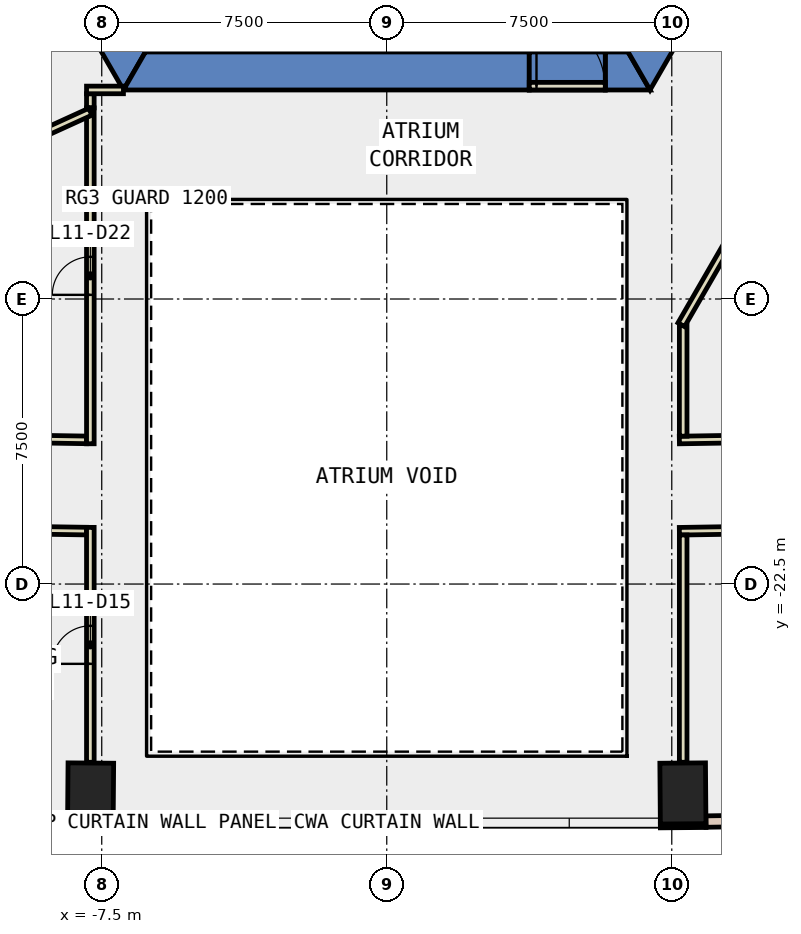
"""IFC4 building model, lengths in metres.
Left out: names, types, materials, properties, quantities, classifications, styles, units other than length and angle.
Written with IfcOpenShell. Run it as: python <this file> out.ifc"""

import sys

from ifc_helpers import new_model, si_unit, direction, frame, frame_2d, origin, origin_2d, place, context, subcontext, project, spatial, polyline, rectangle, outline, extrude, element, fill, save


model = new_model("IFC4")
c1 = context("Model", 3, precision=1e-05, world=origin(), true_north=direction((0.0, 1.0)))
c2 = subcontext(c1, "Body", "Model", "MODEL_VIEW")
j1 = project(units=[si_unit("LENGTHUNIT", "METRE"), si_unit("PLANEANGLEUNIT", "RADIAN")], contexts=[c1])
p1 = place(None, origin())
s1 = spatial("IfcSite", under=j1, at=p1, CompositionType="ELEMENT")
p2 = place(p1, origin())
s2 = spatial("IfcBuilding", under=s1, at=p2, CompositionType="ELEMENT")
p3 = place(p2, frame((0.0, 0.0, 56.0)))
s3 = spatial("IfcBuildingStorey", under=s2, at=p3, CompositionType="ELEMENT", Elevation=56.0)
for number, where, z_axis, x_axis in (
    (1, (-7.793, -28.01, -0.4), (0.0, 0.0, 1.0), (-1.0, 0.008, 0.0)),
    (2, (7.793, -28.01, -0.4), (0.0, 0.0, 1.0), (1.0, 0.008, 0.0)),
):
    element("IfcColumn", number, at=place(p3, frame(where, z_axis=z_axis, x_axis=x_axis)), inside=s3, PredefinedType="COLUMN", context=c2, shape_type="SweptSolid", body=[
        extrude(rectangle(XDim=1.2, YDim=1.6, at=origin_2d()), origin(), (0.0, 0.0, 1.0), 4.2),
    ])
p4 = place(p3, frame((0.0, 0.0, -0.4)))
e3 = element("IfcWall", 3, at=p4, inside=s3, PredefinedType="SHEAR", context=c2, shape_type="SweptSolid", body=[
    extrude(outline(polyline([(-13.856, 2.5), (-6.928, -9.5), (-6.351, -8.5), (-12.702, 2.5), (-13.856, 2.5)])), origin(), (0.0, 0.0, 1.0), 4.2),
])
p5 = place(p3, frame((0.0, 0.0, -0.4)))
e4 = element("IfcWall", 4, at=p5, inside=s3, PredefinedType="SHEAR", context=c2, shape_type="SweptSolid", body=[
    extrude(outline(polyline([(3.75, -9.5), (3.75, -8.5), (-6.351, -8.5), (-6.928, -9.5), (3.75, -9.5)])), origin(), (0.0, 0.0, 1.0), 4.2),
])
p6 = place(p3, frame((0.0, 0.0, -0.4)))
e5 = element("IfcWall", 5, at=p6, inside=s3, PredefinedType="SHEAR", context=c2, shape_type="SweptSolid", body=[
    extrude(outline(polyline([(5.75, -8.5), (5.75, -9.5), (6.928, -9.5), (6.351, -8.5), (5.75, -8.5)])), origin(), (0.0, 0.0, 1.0), 4.2),
])
p7 = place(p3, frame((0.0, 0.0, 3.6)))
e6 = element("IfcWall", 6, at=p7, inside=s3, PredefinedType="SHEAR", context=c2, shape_type="SweptSolid", body=[
    extrude(outline(polyline([(5.75, -9.5), (5.75, -8.5), (3.75, -8.5), (3.75, -9.5), (5.75, -9.5)])), origin(), (0.0, 0.0, 1.0), 0.2),
])
p8 = place(p3, frame((0.0, 0.0, -0.4)))
e7 = element("IfcWall", 7, at=p8, inside=s3, PredefinedType="SHEAR", context=c2, shape_type="SweptSolid", body=[
    extrude(outline(polyline([(8.117, -7.44), (7.252, -6.94), (6.351, -8.5), (6.928, -9.5), (8.117, -7.44)])), origin(), (0.0, 0.0, 1.0), 4.2),
])
for number, where, z_axis, x_axis in (
    (8, (-8.4, -28.855, 0.0), (0.0, 0.0, 1.0), (1.0, -0.008, 0.0)),
    (9, (7.2, -28.865, 0.0), (0.0, 0.0, 1.0), (1.0, 0.008, 0.0)),
):
    element("IfcWall", number, at=place(p3, frame(where, z_axis=z_axis, x_axis=x_axis)), inside=s3, PredefinedType="STANDARD", context=c2, shape_type="SweptSolid", body=[
        extrude(rectangle(XDim=1.2, YDim=0.1, at=frame_2d((0.6, 0.0))), origin(), (0.0, 0.0, 1.0), 3.8),
    ])
p9 = place(p3, frame((-15.568, -28.637, 0.0), z_axis=(0.0, 0.0, 1.0), x_axis=(0.999875756772, -0.015762963512, 0.0)))
e10 = element("IfcWall", 10, at=p9, inside=s3, PredefinedType="STANDARD", context=c2, shape_type="SweptSolid", body=[
    extrude(rectangle(XDim=7.171, YDim=0.3, at=frame_2d((3.585, 0.0))), origin(), (0.0, 0.0, 1.0), 3.8),
])
p10 = place(p9, frame((0.593, 0.0, 0.9)))
e11 = element("IfcOpeningElement", 11, at=p10, cuts=e10, PredefinedType="OPENING", context=c2, shape_type="SweptSolid", body=[
    extrude(rectangle(XDim=2.4, YDim=2.6, at=frame_2d((1.2, 1.3))), frame((0.0, 0.16, 0.0), z_axis=(0.0, -1.0, 0.0), x_axis=(1.0, 0.0, 0.0)), (0.0, 0.0, 1.0), 0.32),
])
p11 = place(p9, frame((4.178, 0.0, 0.9)))
e12 = element("IfcOpeningElement", 12, at=p11, cuts=e10, PredefinedType="OPENING", context=c2, shape_type="SweptSolid", body=[
    extrude(rectangle(XDim=2.4, YDim=2.6, at=frame_2d((1.2, 1.3))), frame((0.0, 0.16, 0.0), z_axis=(0.0, -1.0, 0.0), x_axis=(1.0, 0.0, 0.0)), (0.0, 0.0, 1.0), 0.32),
])
p12 = place(p3, frame((8.398, -28.75, 0.0), z_axis=(0.0, 0.0, 1.0), x_axis=(0.999875756772, 0.015762963512, 0.0)))
e13 = element("IfcWall", 13, at=p12, inside=s3, PredefinedType="STANDARD", context=c2, shape_type="SweptSolid", body=[
    extrude(rectangle(XDim=7.171, YDim=0.3, at=frame_2d((3.585, 0.0))), origin(), (0.0, 0.0, 1.0), 3.8),
])
p13 = place(p12, frame((0.593, 0.0, 0.9)))
e14 = element("IfcOpeningElement", 14, at=p13, cuts=e13, PredefinedType="OPENING", context=c2, shape_type="SweptSolid", body=[
    extrude(rectangle(XDim=2.4, YDim=2.6, at=frame_2d((1.2, 1.3))), frame((0.0, 0.16, 0.0), z_axis=(0.0, -1.0, 0.0), x_axis=(1.0, 0.0, 0.0)), (0.0, 0.0, 1.0), 0.32),
])
p14 = place(p12, frame((4.178, 0.0, 0.9)))
e15 = element("IfcOpeningElement", 15, at=p14, cuts=e13, PredefinedType="OPENING", context=c2, shape_type="SweptSolid", body=[
    extrude(rectangle(XDim=2.4, YDim=2.6, at=frame_2d((1.2, 1.3))), frame((0.0, 0.16, 0.0), z_axis=(0.0, -1.0, 0.0), x_axis=(1.0, 0.0, 0.0)), (0.0, 0.0, 1.0), 0.32),
])
p15 = place(p3, frame((7.7, -18.71, 0.0), z_axis=(0.0, 0.0, 1.0), x_axis=(0.999874256061, 0.015857870791, 0.0)))
e16 = element("IfcWall", 16, at=p15, inside=s3, PredefinedType="PARTITIONING", context=c2, shape_type="SweptSolid", body=[
    extrude(rectangle(XDim=8.252, YDim=0.2, at=frame_2d((4.126, 0.0))), origin(), (0.0, 0.0, 1.0), 3.8),
])
p16 = place(p3, frame((-11.477, -18.65, 0.0), z_axis=(0.0, 0.0, 1.0), x_axis=(0.9998724957, -0.015968479661, 0.0)))
e17 = element("IfcWall", 17, at=p16, inside=s3, PredefinedType="PARTITIONING", context=c2, shape_type="SweptSolid", body=[
    extrude(rectangle(XDim=3.578, YDim=0.2, at=frame_2d((1.789, 0.0))), origin(), (0.0, 0.0, 1.0), 3.8),
])
p17 = place(p3, frame((16.078, -20.978, 0.0), z_axis=(0.0, 0.0, 1.0), x_axis=(-0.999873907997, -0.015879801838, 0.0)))
e18 = element("IfcWall", 18, at=p17, inside=s3, PredefinedType="PARTITIONING", context=c2, shape_type="SweptSolid", body=[
    extrude(rectangle(XDim=8.379, YDim=0.2, at=frame_2d((4.189, 0.0))), origin(), (0.0, 0.0, 1.0), 3.8),
])
p18 = place(p17, frame((3.689, 0.0, 0.0)))
e19 = element("IfcOpeningElement", 19, at=p18, cuts=e18, PredefinedType="OPENING", context=c2, shape_type="SweptSolid", body=[
    extrude(rectangle(XDim=1.0, YDim=2.1, at=frame_2d((0.5, 1.05))), frame((0.0, 0.11, 0.0), z_axis=(0.0, -1.0, 0.0), x_axis=(1.0, 0.0, 0.0)), (0.0, 0.0, 1.0), 0.22),
])
p19 = place(p3, frame((-7.9, -21.107, 0.0), z_axis=(0.0, 0.0, 1.0), x_axis=(-0.999876676102, 0.015704540367, 0.0)))
e20 = element("IfcWall", 20, at=p19, inside=s3, PredefinedType="PARTITIONING", context=c2, shape_type="SweptSolid", body=[
    extrude(rectangle(XDim=3.886, YDim=0.2, at=frame_2d((1.943, 0.0))), origin(), (0.0, 0.0, 1.0), 3.8),
])
p20 = place(p3, frame((7.8, -15.69, 0.0), z_axis=(0.0, 0.0, 1.0), x_axis=(0.0, -1.0, 0.0)))
e21 = element("IfcWall", 21, at=p20, inside=s3, PredefinedType="PARTITIONING", context=c2, shape_type="SweptSolid", body=[
    extrude(rectangle(XDim=2.919, YDim=0.2, at=frame_2d((1.459, 0.0))), origin(), (0.0, 0.0, 1.0), 3.8),
])
p21 = place(p3, frame((-7.8, -9.972, 0.0), z_axis=(0.0, 0.0, 1.0), x_axis=(0.0, 1.0, 0.0)))
e22 = element("IfcWall", 22, at=p21, inside=s3, PredefinedType="PARTITIONING", context=c2, shape_type="SweptSolid", body=[
    extrude(rectangle(XDim=0.373, YDim=0.2, at=frame_2d((0.187, 0.0))), origin(), (0.0, 0.0, 1.0), 3.8),
])
p22 = place(p3, frame((-7.9, -9.499, 0.0), z_axis=(0.0, 0.0, 1.0), x_axis=(1.0, 0.0, 0.0)))
e23 = element("IfcWall", 23, at=p22, inside=s3, PredefinedType="PARTITIONING", context=c2, shape_type="SweptSolid", body=[
    extrude(rectangle(XDim=0.971, YDim=0.2, at=frame_2d((0.485, 0.0))), origin(), (0.0, 0.0, 1.0), 3.8),
])
p23 = place(p3, frame((-7.8, -18.809, 0.0), z_axis=(0.0, 0.0, 1.0), x_axis=(0.0, 1.0, 0.0)))
e24 = element("IfcWall", 24, at=p23, inside=s3, PredefinedType="PARTITIONING", context=c2, shape_type="SweptSolid", body=[
    extrude(rectangle(XDim=8.837, YDim=0.2, at=frame_2d((4.418, 0.0))), origin(), (0.0, 0.0, 1.0), 3.8),
])
p24 = place(p23, frame((3.918, 0.0, 0.0)))
e25 = element("IfcOpeningElement", 25, at=p24, cuts=e24, PredefinedType="OPENING", context=c2, shape_type="SweptSolid", body=[
    extrude(rectangle(XDim=1.0, YDim=2.1, at=frame_2d((0.5, 1.05))), frame((0.0, 0.11, 0.0), z_axis=(0.0, -1.0, 0.0), x_axis=(1.0, 0.0, 0.0)), (0.0, 0.0, 1.0), 0.22),
])
p25 = place(p3, frame((7.8, -21.209, 0.0), z_axis=(0.0, 0.0, 1.0), x_axis=(0.0, -1.0, 0.0)))
e26 = element("IfcWall", 26, at=p25, inside=s3, PredefinedType="PARTITIONING", context=c2, shape_type="SweptSolid", body=[
    extrude(rectangle(XDim=5.981, YDim=0.2, at=frame_2d((2.99, 0.0))), origin(), (0.0, 0.0, 1.0), 3.8),
])
p26 = place(p3, frame((-7.8, -27.19, 0.0), z_axis=(0.0, 0.0, 1.0), x_axis=(0.0, 1.0, 0.0)))
e27 = element("IfcWall", 27, at=p26, inside=s3, PredefinedType="PARTITIONING", context=c2, shape_type="SweptSolid", body=[
    extrude(rectangle(XDim=6.181, YDim=0.2, at=frame_2d((3.09, 0.0))), origin(), (0.0, 0.0, 1.0), 3.8),
])
p27 = place(p26, frame((2.59, 0.0, 0.0)))
e28 = element("IfcOpeningElement", 28, at=p27, cuts=e27, PredefinedType="OPENING", context=c2, shape_type="SweptSolid", body=[
    extrude(rectangle(XDim=1.0, YDim=2.1, at=frame_2d((0.5, 1.05))), frame((0.0, 0.11, 0.0), z_axis=(0.0, -1.0, 0.0), x_axis=(1.0, 0.0, 0.0)), (0.0, 0.0, 1.0), 0.22),
])
p28 = place(p3, frame((-7.8, -10.072, 0.0), z_axis=(0.0, 0.0, 1.0), x_axis=(-0.910011899741, -0.414582129777, 0.0)))
e29 = element("IfcWall", 29, at=p28, inside=s3, PredefinedType="PARTITIONING", context=c2, shape_type="SweptSolid", body=[
    extrude(rectangle(XDim=7.694, YDim=0.2, at=frame_2d((3.847, 0.0))), origin(), (0.0, 0.0, 1.0), 3.8),
])
p29 = place(p3, frame((3.75, -9.4, 0.0), z_axis=(0.0, 0.0, 1.0), x_axis=(1.0, 0.0, 0.0)))
e30 = element("IfcWall", 30, at=p29, inside=s3, PredefinedType="PARTITIONING", context=c2, shape_type="SweptSolid", body=[
    extrude(rectangle(XDim=2.0, YDim=0.2, at=frame_2d((1.0, 0.0))), origin(), (0.0, 0.0, 1.0), 2.4),
])
p30 = place(p29, frame((0.19, 0.0, 0.0)))
e31 = element("IfcOpeningElement", 31, at=p30, cuts=e30, PredefinedType="OPENING", context=c2, shape_type="SweptSolid", body=[
    extrude(rectangle(XDim=1.8, YDim=2.1, at=frame_2d((0.9, 1.05))), frame((0.0, 0.11, 0.0), z_axis=(0.0, -1.0, 0.0), x_axis=(1.0, 0.0, 0.0)), (0.0, 0.0, 1.0), 0.22),
])
p31 = place(p3, frame((12.401, -7.621, 0.0), z_axis=(0.0, 0.0, 1.0), x_axis=(-0.499983724212, -0.866034800411, 0.0)))
e32 = element("IfcWall", 32, at=p31, inside=s3, PredefinedType="PARTITIONING", context=c2, shape_type="SweptSolid", body=[
    extrude(rectangle(XDim=9.302, YDim=0.2, at=frame_2d((4.651, 0.0))), origin(), (0.0, 0.0, 1.0), 3.8),
])
p32 = place(p27, origin())
e33 = element("IfcDoor", 33, at=p32, inside=s3, OperationType="SINGLE_SWING_LEFT", PredefinedType="DOOR", context=c2, shape_type="SweptSolid", body=[
    extrude(rectangle(XDim=1.0, YDim=2.1, at=frame_2d((0.5, 1.05))), frame((0.0, 0.025, 0.0), z_axis=(0.0, -1.0, 0.0), x_axis=(1.0, 0.0, 0.0)), (0.0, 0.0, 1.0), 0.05),
])
fill(e28, e33)
p33 = place(p24, origin())
e34 = element("IfcDoor", 34, at=p33, inside=s3, OperationType="SINGLE_SWING_RIGHT", PredefinedType="DOOR", context=c2, shape_type="SweptSolid", body=[
    extrude(rectangle(XDim=1.0, YDim=2.1, at=frame_2d((0.5, 1.05))), frame((0.0, 0.025, 0.0), z_axis=(0.0, -1.0, 0.0), x_axis=(1.0, 0.0, 0.0)), (0.0, 0.0, 1.0), 0.05),
])
fill(e25, e34)
p34 = place(p30, origin())
e35 = element("IfcDoor", 35, at=p34, inside=s3, OperationType="DOUBLE_DOOR_SINGLE_SWING", PredefinedType="DOOR", context=c2, shape_type="SweptSolid", body=[
    extrude(rectangle(XDim=1.8, YDim=2.1, at=frame_2d((0.9, 1.05))), frame((0.0, 0.025, 0.0), z_axis=(0.0, -1.0, 0.0), x_axis=(1.0, 0.0, 0.0)), (0.0, 0.0, 1.0), 0.05),
])
fill(e31, e35)
save(model, sys.argv[1])
